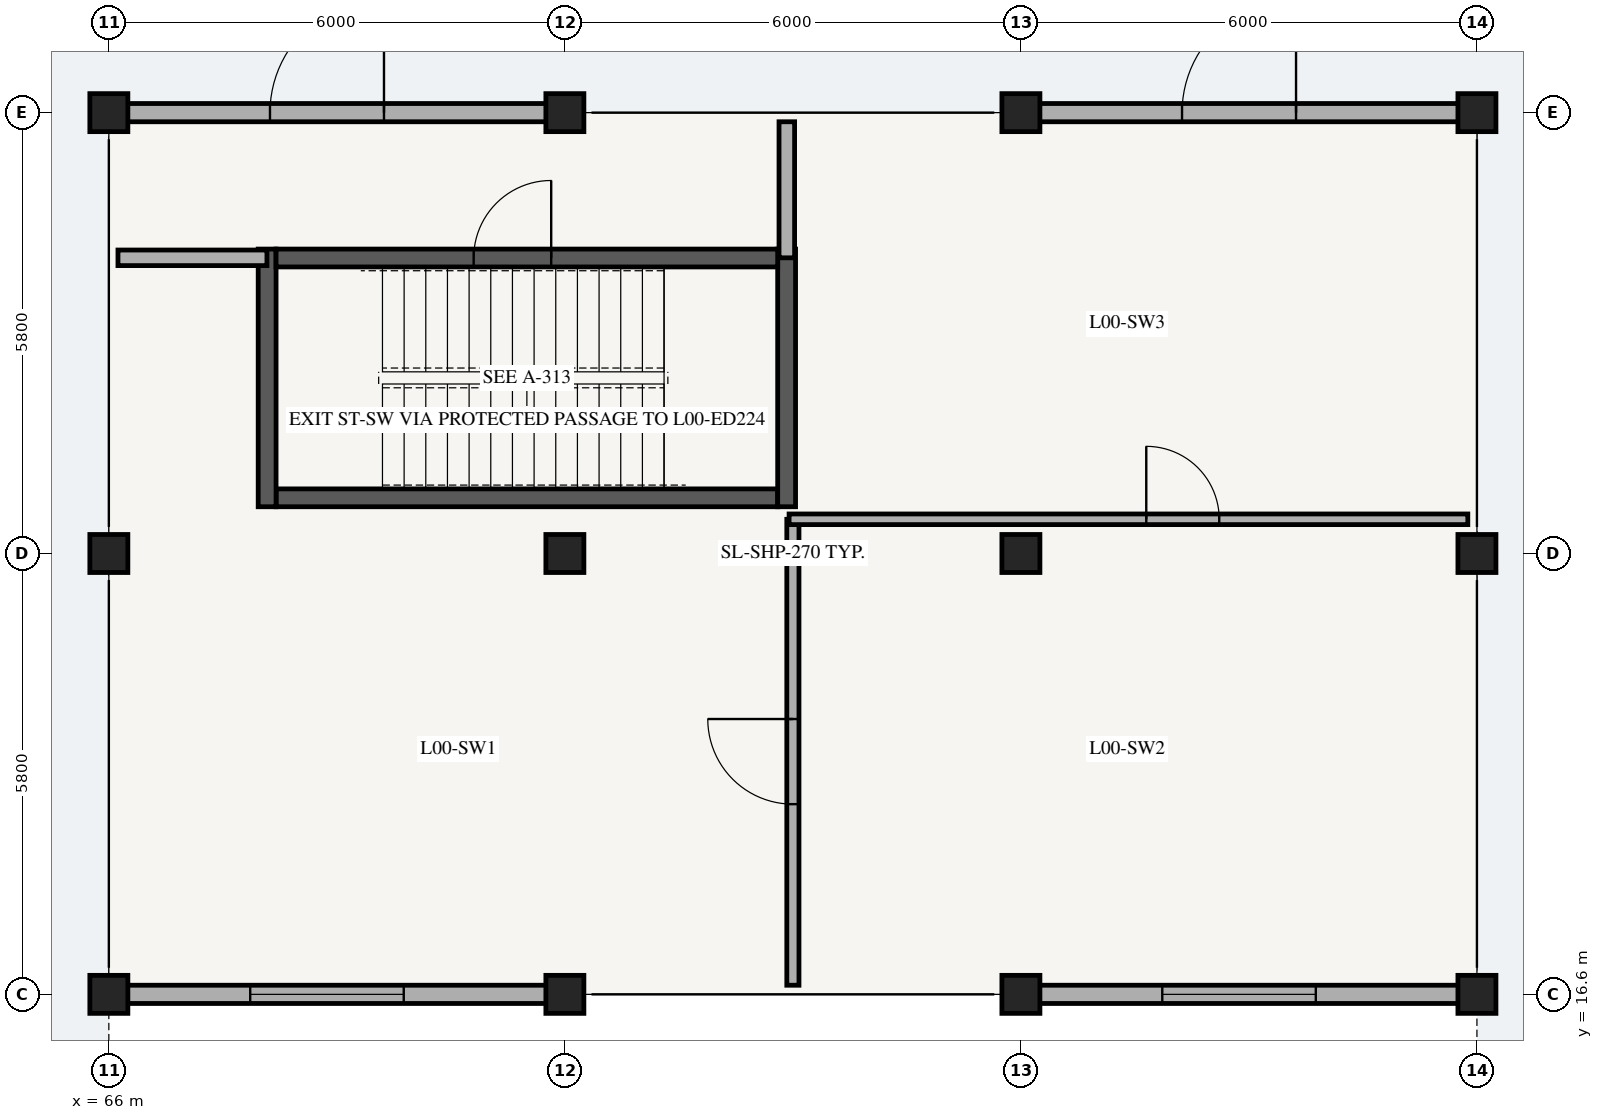
"""IFC4 building model, lengths in metres.
Left out: names, types, materials, properties, quantities, classifications, styles, units other than length and angle.
Written with IfcOpenShell. Run it as: python <this file> out.ifc"""

import sys

from ifc_helpers import new_model, si_unit, direction, frame, frame_2d, origin, origin_2d, place, context, subcontext, project, spatial, rectangle, extrude, element, fill, save


model = new_model("IFC4")
c1 = context("Model", 3, precision=1e-05, world=origin(), true_north=direction((0.0, 1.0)))
c2 = subcontext(c1, "Body", "Model", "MODEL_VIEW")
j1 = project(units=[si_unit("LENGTHUNIT", "METRE"), si_unit("PLANEANGLEUNIT", "RADIAN")], contexts=[c1])
p1 = place(None, origin())
s1 = spatial("IfcSite", under=j1, at=p1, CompositionType="ELEMENT")
p2 = place(p1, origin())
s2 = spatial("IfcBuilding", under=s1, at=p2, CompositionType="ELEMENT")
p3 = place(p2, origin())
s3 = spatial("IfcBuildingStorey", under=s2, at=p3, CompositionType="ELEMENT", Elevation=0.0)
p4 = place(p3, frame((68.2, 23.133, 0.0), z_axis=(0.0, 0.0, 1.0), x_axis=(1.0, 0.0, 0.0)))
e1 = element("IfcWall", 1, at=p4, inside=s3, PredefinedType="SHEAR", context=c2, shape_type="SweptSolid", body=[
    extrude(rectangle(XDim=6.6, YDim=0.235, at=frame_2d((3.3, 0.0))), origin(), (0.0, 0.0, 1.0), 4.49),
])
for number, where, z_axis, x_axis in (
    (2, (74.917, 23.015, 0.0), (0.0, 0.0, 1.0), (0.0, 1.0, 0.0)),
    (3, (68.083, 23.015, 0.0), (0.0, 0.0, 1.0), (0.0, 1.0, 0.0)),
):
    element("IfcWall", number, at=place(p3, frame(where, z_axis=z_axis, x_axis=x_axis)), inside=s3, PredefinedType="SHEAR", context=c2, shape_type="SweptSolid", body=[
        extrude(rectangle(XDim=3.39, YDim=0.235, at=frame_2d((1.695, 0.0))), origin(), (0.0, 0.0, 1.0), 4.49),
    ])
p5 = place(p3, frame((68.2, 26.288, 0.0), z_axis=(0.0, 0.0, 1.0), x_axis=(1.0, 0.0, 0.0)))
e4 = element("IfcWall", 4, at=p5, inside=s3, PredefinedType="SHEAR", context=c2, shape_type="SweptSolid", body=[
    extrude(rectangle(XDim=6.6, YDim=0.235, at=frame_2d((3.3, 0.0))), origin(), (0.0, 0.0, 1.0), 4.49),
])
p6 = place(p5, frame((2.6, 0.0, 0.0)))
e5 = element("IfcOpeningElement", 5, at=p6, cuts=e4, PredefinedType="OPENING", context=c2, shape_type="SweptSolid", body=[
    extrude(rectangle(XDim=1.02, YDim=2.14, at=frame_2d((0.51, 1.07))), frame((0.0, 0.127, 0.0), z_axis=(0.0, -1.0, 0.0), x_axis=(1.0, 0.0, 0.0)), (0.0, 0.0, 1.0), 0.255),
])
for number, where, z_axis, x_axis in (
    (6, (66.0, 16.6, 0.0), (0.0, 0.0, 1.0), (1.0, 0.0, 0.0)),
    (7, (66.0, 22.4, 0.0), (0.0, 0.0, 1.0), (1.0, 0.0, 0.0)),
    (8, (66.0, 28.2, 0.0), (0.0, 0.0, 1.0), (1.0, 0.0, 0.0)),
    (9, (72.0, 16.6, 0.0), (0.0, 0.0, 1.0), (1.0, 0.0, 0.0)),
    (10, (72.0, 22.4, 0.0), (0.0, 0.0, 1.0), (1.0, 0.0, 0.0)),
    (11, (72.0, 28.2, 0.0), (0.0, 0.0, 1.0), (1.0, 0.0, 0.0)),
    (12, (78.0, 16.6, 0.0), (0.0, 0.0, 1.0), (1.0, 0.0, 0.0)),
    (13, (78.0, 22.4, 0.0), (0.0, 0.0, 1.0), (1.0, 0.0, 0.0)),
    (14, (78.0, 28.2, 0.0), (0.0, 0.0, 1.0), (1.0, 0.0, 0.0)),
    (15, (84.0, 16.6, 0.0), (0.0, 0.0, 1.0), (1.0, 0.0, 0.0)),
    (16, (84.0, 22.4, 0.0), (0.0, 0.0, 1.0), (1.0, 0.0, 0.0)),
    (17, (84.0, 28.2, 0.0), (0.0, 0.0, 1.0), (1.0, 0.0, 0.0)),
):
    element("IfcColumn", number, at=place(p3, frame(where, z_axis=z_axis, x_axis=x_axis)), inside=s3, PredefinedType="COLUMN", context=c2, shape_type="SweptSolid", body=[
        extrude(rectangle(XDim=0.5, YDim=0.5, at=origin_2d()), origin(), (0.0, 0.0, 1.0), 4.49),
    ])
p7 = place(p3, frame((66.22, 16.6, 0.0), z_axis=(0.0, 0.0, 1.0), x_axis=(1.0, 0.0, 0.0)))
e18 = element("IfcWall", 18, at=p7, inside=s3, PredefinedType="SOLIDWALL", context=c2, shape_type="SweptSolid", body=[
    extrude(rectangle(XDim=5.56, YDim=0.24, at=frame_2d((2.78, 0.0))), origin(), (0.0, 0.0, 1.0), 3.75),
])
p8 = place(p7, frame((1.64, 0.0, 0.55)))
e19 = element("IfcOpeningElement", 19, at=p8, cuts=e18, PredefinedType="OPENING", context=c2, shape_type="SweptSolid", body=[
    extrude(rectangle(XDim=2.02, YDim=1.95, at=frame_2d((1.01, 0.975))), frame((0.0, 0.13, 0.0), z_axis=(0.0, -1.0, 0.0), x_axis=(1.0, 0.0, 0.0)), (0.0, 0.0, 1.0), 0.26),
])
p9 = place(p3, frame((78.22, 16.6, 0.0), z_axis=(0.0, 0.0, 1.0), x_axis=(1.0, 0.0, 0.0)))
e20 = element("IfcWall", 20, at=p9, inside=s3, PredefinedType="SOLIDWALL", context=c2, shape_type="SweptSolid", body=[
    extrude(rectangle(XDim=5.56, YDim=0.24, at=frame_2d((2.78, 0.0))), origin(), (0.0, 0.0, 1.0), 3.75),
])
p10 = place(p9, frame((1.64, 0.0, 0.55)))
e21 = element("IfcOpeningElement", 21, at=p10, cuts=e20, PredefinedType="OPENING", context=c2, shape_type="SweptSolid", body=[
    extrude(rectangle(XDim=2.02, YDim=1.95, at=frame_2d((1.01, 0.975))), frame((0.0, 0.13, 0.0), z_axis=(0.0, -1.0, 0.0), x_axis=(1.0, 0.0, 0.0)), (0.0, 0.0, 1.0), 0.26),
])
p11 = place(p3, frame((66.22, 28.2, 0.0), z_axis=(0.0, 0.0, 1.0), x_axis=(1.0, 0.0, 0.0)))
e22 = element("IfcWall", 22, at=p11, inside=s3, PredefinedType="SOLIDWALL", context=c2, shape_type="SweptSolid", body=[
    extrude(rectangle(XDim=5.56, YDim=0.24, at=frame_2d((2.78, 0.0))), origin(), (0.0, 0.0, 1.0), 3.75),
])
p12 = place(p11, frame((1.9, 0.0, 0.0)))
e23 = element("IfcOpeningElement", 23, at=p12, cuts=e22, PredefinedType="OPENING", context=c2, shape_type="SweptSolid", body=[
    extrude(rectangle(XDim=1.5, YDim=2.2, at=frame_2d((0.75, 1.1))), frame((0.0, 0.13, 0.0), z_axis=(0.0, -1.0, 0.0), x_axis=(1.0, 0.0, 0.0)), (0.0, 0.0, 1.0), 0.26),
])
p13 = place(p3, frame((78.22, 28.2, 0.0), z_axis=(0.0, 0.0, 1.0), x_axis=(1.0, 0.0, 0.0)))
e24 = element("IfcWall", 24, at=p13, inside=s3, PredefinedType="SOLIDWALL", context=c2, shape_type="SweptSolid", body=[
    extrude(rectangle(XDim=5.56, YDim=0.24, at=frame_2d((2.78, 0.0))), origin(), (0.0, 0.0, 1.0), 3.75),
])
p14 = place(p13, frame((1.9, 0.0, 0.0)))
e25 = element("IfcOpeningElement", 25, at=p14, cuts=e24, PredefinedType="OPENING", context=c2, shape_type="SweptSolid", body=[
    extrude(rectangle(XDim=1.5, YDim=2.2, at=frame_2d((0.75, 1.1))), frame((0.0, 0.13, 0.0), z_axis=(0.0, -1.0, 0.0), x_axis=(1.0, 0.0, 0.0)), (0.0, 0.0, 1.0), 0.26),
])
p15 = place(p3, frame((66.12, 26.29, 0.0), z_axis=(0.0, 0.0, 1.0), x_axis=(1.0, 0.0, 0.0)))
e26 = element("IfcWall", 26, at=p15, inside=s3, PredefinedType="PARTITIONING", context=c2, shape_type="SweptSolid", body=[
    extrude(rectangle(XDim=1.96, YDim=0.205, at=frame_2d((0.98, 0.0))), origin(), (0.0, 0.0, 1.0), 3.52),
])
p16 = place(p3, frame((74.92, 26.29, 0.0), z_axis=(0.0, 0.0, 1.0), x_axis=(0.0, 1.0, 0.0)))
e27 = element("IfcWall", 27, at=p16, inside=s3, PredefinedType="PARTITIONING", context=c2, shape_type="SweptSolid", body=[
    extrude(rectangle(XDim=1.79, YDim=0.205, at=frame_2d((0.895, 0.0))), origin(), (0.0, 0.0, 1.0), 3.52),
])
p17 = place(p3, frame((75.0, 16.72, 0.0), z_axis=(0.0, 0.0, 1.0), x_axis=(0.0, 1.0, 0.0)))
e28 = element("IfcWall", 28, at=p17, inside=s3, PredefinedType="PARTITIONING", context=c2, shape_type="SweptSolid", body=[
    extrude(rectangle(XDim=6.13, YDim=0.16, at=frame_2d((3.065, 0.0))), origin(), (0.0, 0.0, 1.0), 3.52),
])
p18 = place(p17, frame((2.382, 0.0, 0.0)))
e29 = element("IfcOpeningElement", 29, at=p18, cuts=e28, PredefinedType="OPENING", context=c2, shape_type="SweptSolid", body=[
    extrude(rectangle(XDim=1.12, YDim=2.12, at=frame_2d((0.56, 1.06))), frame((0.0, 0.09, 0.0), z_axis=(0.0, -1.0, 0.0), x_axis=(1.0, 0.0, 0.0)), (0.0, 0.0, 1.0), 0.18),
])
p19 = place(p3, frame((74.95, 22.85, 0.0), z_axis=(0.0, 0.0, 1.0), x_axis=(1.0, 0.0, 0.0)))
e30 = element("IfcWall", 30, at=p19, inside=s3, PredefinedType="PLUMBINGWALL", context=c2, shape_type="SweptSolid", body=[
    extrude(rectangle(XDim=8.93, YDim=0.14, at=frame_2d((4.465, 0.0))), origin(), (0.0, 0.0, 1.0), 3.52),
])
p20 = place(p19, frame((4.699, 0.0, 0.0)))
e31 = element("IfcOpeningElement", 31, at=p20, cuts=e30, PredefinedType="OPENING", context=c2, shape_type="SweptSolid", body=[
    extrude(rectangle(XDim=0.96, YDim=2.1, at=frame_2d((0.48, 1.05))), frame((0.0, 0.08, 0.0), z_axis=(0.0, -1.0, 0.0), x_axis=(1.0, 0.0, 0.0)), (0.0, 0.0, 1.0), 0.16),
])
p21 = place(p8, origin())
e32 = element("IfcWindow", 32, at=p21, inside=s3, PartitioningType="SINGLE_PANEL", PredefinedType="WINDOW", context=c2, shape_type="SweptSolid", body=[
    extrude(rectangle(XDim=2.02, YDim=1.95, at=frame_2d((1.01, 0.975))), frame((0.0, 0.03, 0.0), z_axis=(0.0, -1.0, 0.0), x_axis=(1.0, 0.0, 0.0)), (0.0, 0.0, 1.0), 0.06),
])
fill(e19, e32)
p22 = place(p10, origin())
e33 = element("IfcWindow", 33, at=p22, inside=s3, PartitioningType="SINGLE_PANEL", PredefinedType="WINDOW", context=c2, shape_type="SweptSolid", body=[
    extrude(rectangle(XDim=2.02, YDim=1.95, at=frame_2d((1.01, 0.975))), frame((0.0, 0.03, 0.0), z_axis=(0.0, -1.0, 0.0), x_axis=(1.0, 0.0, 0.0)), (0.0, 0.0, 1.0), 0.06),
])
fill(e21, e33)
p23 = place(p12, origin())
e34 = element("IfcDoor", 34, at=p23, inside=s3, OperationType="DOUBLE_DOOR_SINGLE_SWING", PredefinedType="DOOR", context=c2, shape_type="SweptSolid", body=[
    extrude(rectangle(XDim=1.5, YDim=2.2, at=frame_2d((0.75, 1.1))), frame((0.0, 0.025, 0.0), z_axis=(0.0, -1.0, 0.0), x_axis=(1.0, 0.0, 0.0)), (0.0, 0.0, 1.0), 0.05),
])
fill(e23, e34)
p24 = place(p14, origin())
e35 = element("IfcDoor", 35, at=p24, inside=s3, OperationType="DOUBLE_DOOR_SINGLE_SWING", PredefinedType="DOOR", context=c2, shape_type="SweptSolid", body=[
    extrude(rectangle(XDim=1.5, YDim=2.2, at=frame_2d((0.75, 1.1))), frame((0.0, 0.025, 0.0), z_axis=(0.0, -1.0, 0.0), x_axis=(1.0, 0.0, 0.0)), (0.0, 0.0, 1.0), 0.05),
])
fill(e25, e35)
p25 = place(p6, origin())
e36 = element("IfcDoor", 36, at=p25, inside=s3, OperationType="SINGLE_SWING_RIGHT", PredefinedType="DOOR", context=c2, shape_type="SweptSolid", body=[
    extrude(rectangle(XDim=1.02, YDim=2.14, at=frame_2d((0.51, 1.07))), frame((0.0, 0.025, 0.0), z_axis=(0.0, -1.0, 0.0), x_axis=(1.0, 0.0, 0.0)), (0.0, 0.0, 1.0), 0.05),
])
fill(e5, e36)
p26 = place(p18, origin())
e37 = element("IfcDoor", 37, at=p26, inside=s3, OperationType="SINGLE_SWING_RIGHT", PredefinedType="DOOR", context=c2, shape_type="SweptSolid", body=[
    extrude(rectangle(XDim=1.12, YDim=2.12, at=frame_2d((0.56, 1.06))), frame((0.0, 0.025, 0.0), z_axis=(0.0, -1.0, 0.0), x_axis=(1.0, 0.0, 0.0)), (0.0, 0.0, 1.0), 0.05),
])
fill(e29, e37)
p27 = place(p20, origin())
e38 = element("IfcDoor", 38, at=p27, inside=s3, OperationType="SINGLE_SWING_LEFT", PredefinedType="DOOR", context=c2, shape_type="SweptSolid", body=[
    extrude(rectangle(XDim=0.96, YDim=2.1, at=frame_2d((0.48, 1.05))), frame((0.0, 0.025, 0.0), z_axis=(0.0, -1.0, 0.0), x_axis=(1.0, 0.0, 0.0)), (0.0, 0.0, 1.0), 0.05),
])
fill(e31, e38)
save(model, sys.argv[1])
